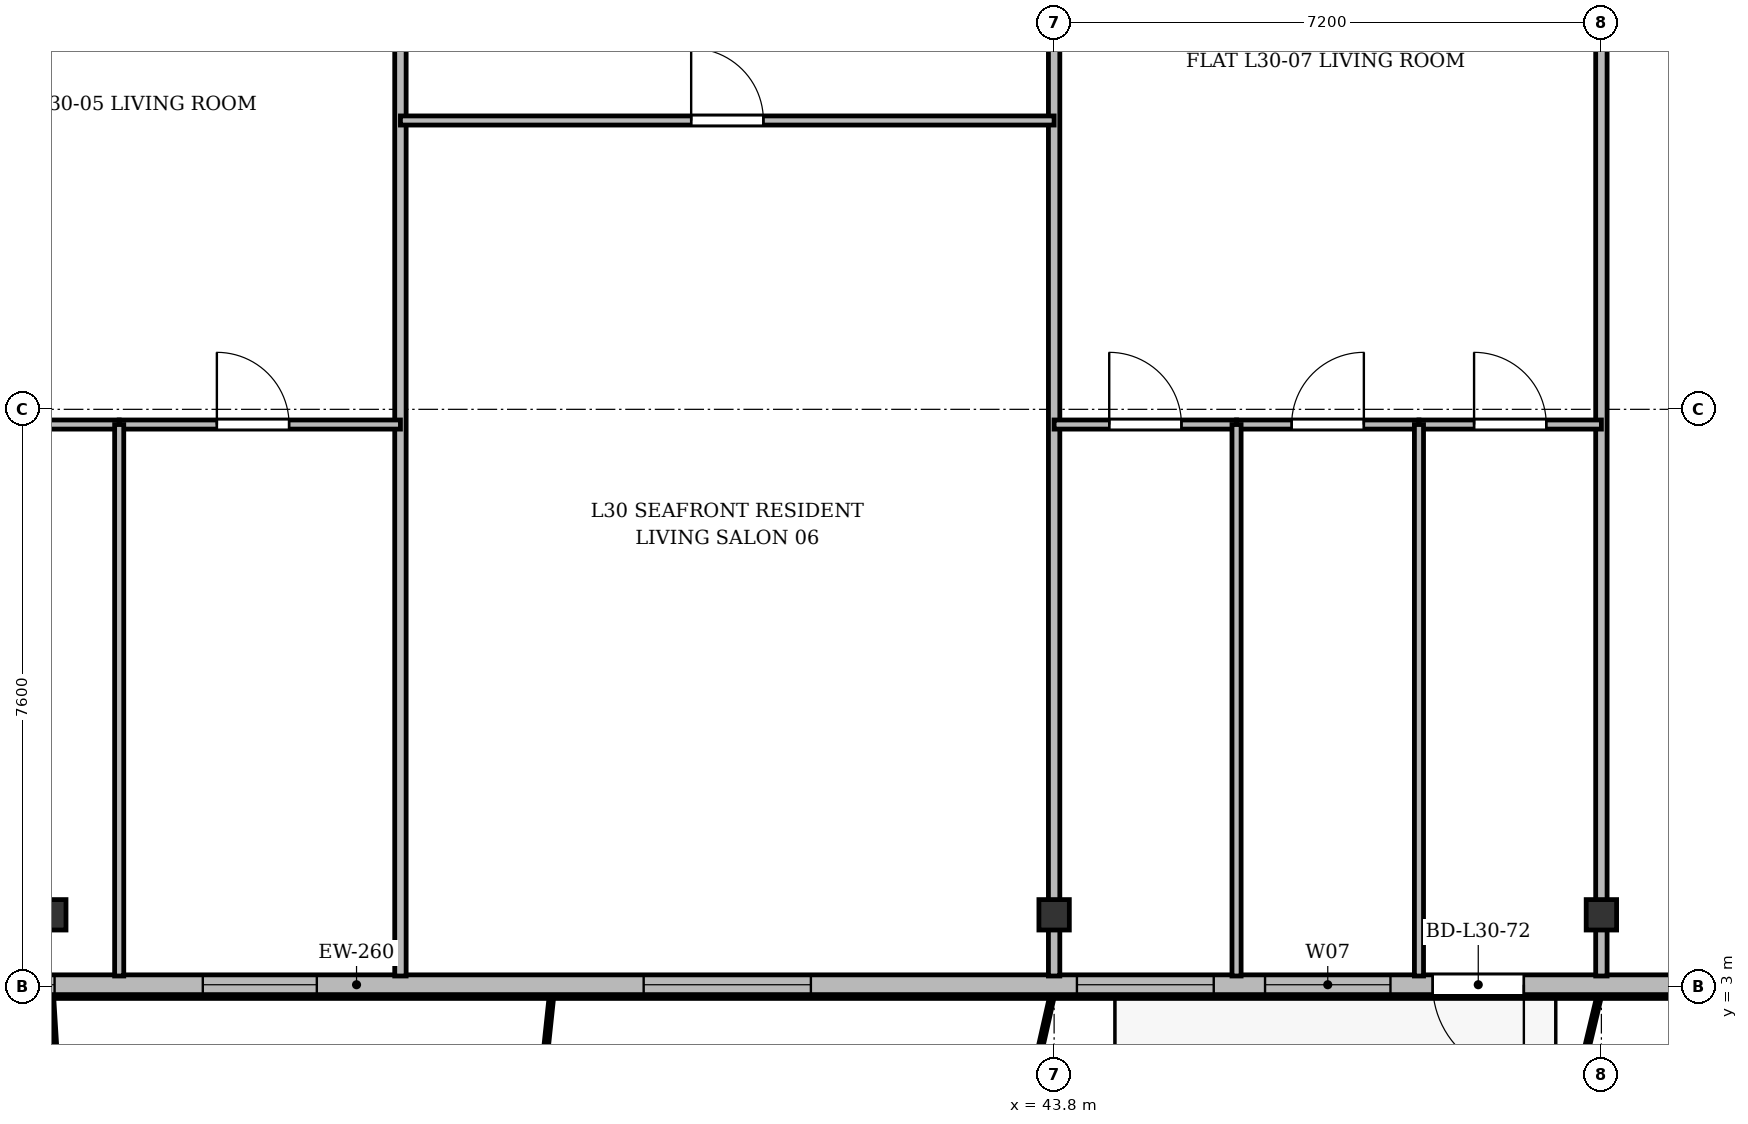
"""IFC4 building model, lengths in metres.
Left out: names, types, materials, properties, quantities, classifications, styles, units other than length and angle.
Written with IfcOpenShell. Run it as: python <this file> out.ifc"""

import sys

from ifc_helpers import new_model, si_unit, direction, frame, frame_2d, origin, origin_2d, place, context, subcontext, project, spatial, rectangle, i_section, extrude, source, transform, mapped, element, fill, save


model = new_model("IFC4")
c1 = context("Model", 3, precision=1e-05, world=origin(), true_north=direction((0.0, 1.0)))
c2 = subcontext(c1, "Body", "Model", "MODEL_VIEW")
j1 = project(units=[si_unit("LENGTHUNIT", "METRE"), si_unit("PLANEANGLEUNIT", "RADIAN")], contexts=[c1])
p1 = place(None, origin())
s1 = spatial("IfcSite", under=j1, at=p1, CompositionType="ELEMENT")
p2 = place(p1, origin())
s2 = spatial("IfcBuilding", under=s1, at=p2, CompositionType="ELEMENT")
p3 = place(p2, frame((0.0, 0.0, 117.7)))
s3 = spatial("IfcBuildingStorey", under=s2, at=p3, CompositionType="ELEMENT", Elevation=117.7)
m1 = source(origin(), c2, "Body", "SweptSolid", [
    extrude(i_section(OverallWidth=0.4, OverallDepth=0.4, WebThickness=0.022, FlangeThickness=0.035, at=origin_2d()), origin(), (0.0, 0.0, 1.0), 3.6),
])
for number, where, z_axis, x_axis in (
    (1, (30.6, 3.95, 0.0), (0.0, 0.0, 1.0), (1.0, 0.0, 0.0)),
    (2, (43.8, 3.95, 0.0), (0.0, 0.0, 1.0), (1.0, 0.0, 0.0)),
    (3, (51.0, 3.95, 0.0), (0.0, 0.0, 1.0), (1.0, 0.0, 0.0)),
):
    element("IfcColumn", number, at=place(p3, frame(where, z_axis=z_axis, x_axis=x_axis)), inside=s3, PredefinedType="COLUMN", context=c2, shape_type="MappedRepresentation", body=[
        mapped(m1, transform((0.0, 0.0, 0.0), x_axis=(1.0, 0.0, 0.0), y_axis=(0.0, 1.0, 0.0), z_axis=(0.0, 0.0, 1.0), scale=1.0)),
    ])
p4 = place(p3, frame((66.9, 3.03, 0.0), z_axis=(0.0, 0.0, 1.0), x_axis=(-1.0, 0.0, 0.0)))
e4 = element("IfcWall", 4, at=p4, inside=s3, PredefinedType="SOLIDWALL", context=c2, shape_type="SweptSolid", body=[
    extrude(rectangle(XDim=59.4, YDim=0.26, at=frame_2d((29.7, 0.0))), origin(), (0.0, 0.0, 1.0), 3.34),
])
p5 = place(p4, frame((0.395, 0.0, 0.9)))
e5 = element("IfcOpeningElement", 5, at=p5, cuts=e4, PredefinedType="OPENING", context=c2, shape_type="SweptSolid", body=[
    extrude(rectangle(XDim=1.8, YDim=1.8, at=frame_2d((0.9, 0.9))), frame((0.0, 0.14, 0.0), z_axis=(0.0, -1.0, 0.0), x_axis=(1.0, 0.0, 0.0)), (0.0, 0.0, 1.0), 0.28),
])
p6 = place(p4, frame((4.2, 0.0, 0.9)))
e6 = element("IfcOpeningElement", 6, at=p6, cuts=e4, PredefinedType="OPENING", context=c2, shape_type="SweptSolid", body=[
    extrude(rectangle(XDim=2.2, YDim=1.8, at=frame_2d((1.1, 0.9))), frame((0.0, 0.14, 0.0), z_axis=(0.0, -1.0, 0.0), x_axis=(1.0, 0.0, 0.0)), (0.0, 0.0, 1.0), 0.28),
])
p7 = place(p4, frame((11.25, 0.0, 0.9)))
e7 = element("IfcOpeningElement", 7, at=p7, cuts=e4, PredefinedType="OPENING", context=c2, shape_type="SweptSolid", body=[
    extrude(rectangle(XDim=1.5, YDim=1.75, at=frame_2d((0.75, 0.875))), frame((0.0, 0.14, 0.0), z_axis=(0.0, -1.0, 0.0), x_axis=(1.0, 0.0, 0.0)), (0.0, 0.0, 1.0), 0.28),
])
p8 = place(p4, frame((16.92, 0.0, 0.0)))
e8 = element("IfcOpeningElement", 8, at=p8, cuts=e4, PredefinedType="OPENING", context=c2, shape_type="SweptSolid", body=[
    extrude(rectangle(XDim=1.2, YDim=2.2, at=frame_2d((0.6, 1.1))), frame((0.0, 0.14, 0.0), z_axis=(0.0, -1.0, 0.0), x_axis=(1.0, 0.0, 0.0)), (0.0, 0.0, 1.0), 0.28),
])
p9 = place(p4, frame((18.675, 0.0, 0.9)))
e9 = element("IfcOpeningElement", 9, at=p9, cuts=e4, PredefinedType="OPENING", context=c2, shape_type="SweptSolid", body=[
    extrude(rectangle(XDim=1.65, YDim=1.85, at=frame_2d((0.825, 0.925))), frame((0.0, 0.14, 0.0), z_axis=(0.0, -1.0, 0.0), x_axis=(1.0, 0.0, 0.0)), (0.0, 0.0, 1.0), 0.28),
])
p10 = place(p4, frame((21.0, 0.0, 0.9)))
e10 = element("IfcOpeningElement", 10, at=p10, cuts=e4, PredefinedType="OPENING", context=c2, shape_type="SweptSolid", body=[
    extrude(rectangle(XDim=1.8, YDim=1.8, at=frame_2d((0.9, 0.9))), frame((0.0, 0.14, 0.0), z_axis=(0.0, -1.0, 0.0), x_axis=(1.0, 0.0, 0.0)), (0.0, 0.0, 1.0), 0.28),
])
p11 = place(p4, frame((26.3, 0.0, 0.9)))
e11 = element("IfcOpeningElement", 11, at=p11, cuts=e4, PredefinedType="OPENING", context=c2, shape_type="SweptSolid", body=[
    extrude(rectangle(XDim=2.2, YDim=1.8, at=frame_2d((1.1, 0.9))), frame((0.0, 0.14, 0.0), z_axis=(0.0, -1.0, 0.0), x_axis=(1.0, 0.0, 0.0)), (0.0, 0.0, 1.0), 0.28),
])
p12 = place(p4, frame((32.8, 0.0, 0.9)))
e12 = element("IfcOpeningElement", 12, at=p12, cuts=e4, PredefinedType="OPENING", context=c2, shape_type="SweptSolid", body=[
    extrude(rectangle(XDim=1.5, YDim=1.75, at=frame_2d((0.75, 0.875))), frame((0.0, 0.14, 0.0), z_axis=(0.0, -1.0, 0.0), x_axis=(1.0, 0.0, 0.0)), (0.0, 0.0, 1.0), 0.28),
])
p13 = place(p4, frame((36.25, 0.0, 0.9)))
e13 = element("IfcOpeningElement", 13, at=p13, cuts=e4, PredefinedType="OPENING", context=c2, shape_type="SweptSolid", body=[
    extrude(rectangle(XDim=2.0, YDim=1.95, at=frame_2d((1.0, 0.975))), frame((0.0, 0.14, 0.0), z_axis=(0.0, -1.0, 0.0), x_axis=(1.0, 0.0, 0.0)), (0.0, 0.0, 1.0), 0.28),
])
p14 = place(p4, frame((39.775, 0.0, 0.9)))
e14 = element("IfcOpeningElement", 14, at=p14, cuts=e4, PredefinedType="OPENING", context=c2, shape_type="SweptSolid", body=[
    extrude(rectangle(XDim=1.65, YDim=1.85, at=frame_2d((0.825, 0.925))), frame((0.0, 0.14, 0.0), z_axis=(0.0, -1.0, 0.0), x_axis=(1.0, 0.0, 0.0)), (0.0, 0.0, 1.0), 0.28),
])
p15 = place(p4, frame((42.7, 0.0, 0.9)))
e15 = element("IfcOpeningElement", 15, at=p15, cuts=e4, PredefinedType="OPENING", context=c2, shape_type="SweptSolid", body=[
    extrude(rectangle(XDim=1.8, YDim=1.8, at=frame_2d((0.9, 0.9))), frame((0.0, 0.14, 0.0), z_axis=(0.0, -1.0, 0.0), x_axis=(1.0, 0.0, 0.0)), (0.0, 0.0, 1.0), 0.28),
])
p16 = place(p4, frame((46.435, 0.0, 0.0)))
e16 = element("IfcOpeningElement", 16, at=p16, cuts=e4, PredefinedType="OPENING", context=c2, shape_type="SweptSolid", body=[
    extrude(rectangle(XDim=1.2, YDim=2.2, at=frame_2d((0.6, 1.1))), frame((0.0, 0.14, 0.0), z_axis=(0.0, -1.0, 0.0), x_axis=(1.0, 0.0, 0.0)), (0.0, 0.0, 1.0), 0.28),
])
p17 = place(p4, frame((49.0, 0.0, 0.9)))
e17 = element("IfcOpeningElement", 17, at=p17, cuts=e4, PredefinedType="OPENING", context=c2, shape_type="SweptSolid", body=[
    extrude(rectangle(XDim=1.5, YDim=1.75, at=frame_2d((0.75, 0.875))), frame((0.0, 0.14, 0.0), z_axis=(0.0, -1.0, 0.0), x_axis=(1.0, 0.0, 0.0)), (0.0, 0.0, 1.0), 0.28),
])
p18 = place(p4, frame((53.0, 0.0, 0.9)))
e18 = element("IfcOpeningElement", 18, at=p18, cuts=e4, PredefinedType="OPENING", context=c2, shape_type="SweptSolid", body=[
    extrude(rectangle(XDim=2.0, YDim=1.95, at=frame_2d((1.0, 0.975))), frame((0.0, 0.14, 0.0), z_axis=(0.0, -1.0, 0.0), x_axis=(1.0, 0.0, 0.0)), (0.0, 0.0, 1.0), 0.28),
])
p19 = place(p4, frame((57.18, 0.0, 0.9)))
e19 = element("IfcOpeningElement", 19, at=p19, cuts=e4, PredefinedType="OPENING", context=c2, shape_type="SweptSolid", body=[
    extrude(rectangle(XDim=1.65, YDim=1.85, at=frame_2d((0.825, 0.925))), frame((0.0, 0.14, 0.0), z_axis=(0.0, -1.0, 0.0), x_axis=(1.0, 0.0, 0.0)), (0.0, 0.0, 1.0), 0.28),
])
p20 = place(p3, frame((35.2, 3.145, 0.0), z_axis=(0.0, 0.0, 1.0), x_axis=(0.0, 1.0, 0.0)))
e20 = element("IfcWall", 20, at=p20, inside=s3, PredefinedType="PARTITIONING", context=c2, shape_type="SweptSolid", body=[
    extrude(rectangle(XDim=24.455, YDim=0.15, at=frame_2d((12.228, 0.0))), origin(), (0.0, 0.0, 1.0), 2.752),
])
for number, where, z_axis, x_axis in (
    (21, (43.8, 3.145, 0.0), (0.0, 0.0, 1.0), (0.0, 1.0, 0.0)),
    (22, (51.0, 3.145, 0.0), (0.0, 0.0, 1.0), (0.0, 1.0, 0.0)),
):
    element("IfcWall", number, at=place(p3, frame(where, z_axis=z_axis, x_axis=x_axis)), inside=s3, PredefinedType="PARTITIONING", context=c2, shape_type="SweptSolid", body=[
        extrude(rectangle(XDim=24.455, YDim=0.15, at=frame_2d((12.228, 0.0))), origin(), (0.0, 0.0, 1.0), 2.84),
    ])
p21 = place(p3, frame((27.8, 10.4, 0.0), z_axis=(0.0, 0.0, 1.0), x_axis=(1.0, 0.0, 0.0)))
e23 = element("IfcWall", 23, at=p21, inside=s3, PredefinedType="PARTITIONING", context=c2, shape_type="SweptSolid", body=[
    extrude(rectangle(XDim=3.7, YDim=0.12, at=frame_2d((1.85, 0.0))), origin(), (0.0, 0.0, 1.0), 2.84),
])
p22 = place(p21, frame((1.285, 0.0, 0.0)))
e24 = element("IfcOpeningElement", 24, at=p22, cuts=e23, PredefinedType="OPENING", context=c2, shape_type="SweptSolid", body=[
    extrude(rectangle(XDim=0.95, YDim=2.15, at=frame_2d((0.475, 1.075))), frame((0.0, 0.07, 0.0), z_axis=(0.0, -1.0, 0.0), x_axis=(1.0, 0.0, 0.0)), (0.0, 0.0, 1.0), 0.14),
])
p23 = place(p3, frame((31.5, 10.4, 0.0), z_axis=(0.0, 0.0, 1.0), x_axis=(1.0, 0.0, 0.0)))
e25 = element("IfcWall", 25, at=p23, inside=s3, PredefinedType="PARTITIONING", context=c2, shape_type="SweptSolid", body=[
    extrude(rectangle(XDim=3.7, YDim=0.12, at=frame_2d((1.85, 0.0))), origin(), (0.0, 0.0, 1.0), 3.34),
])
p24 = place(p23, frame((1.285, 0.0, 0.0)))
e26 = element("IfcOpeningElement", 26, at=p24, cuts=e25, PredefinedType="OPENING", context=c2, shape_type="SweptSolid", body=[
    extrude(rectangle(XDim=0.95, YDim=2.15, at=frame_2d((0.475, 1.075))), frame((0.0, 0.07, 0.0), z_axis=(0.0, -1.0, 0.0), x_axis=(1.0, 0.0, 0.0)), (0.0, 0.0, 1.0), 0.14),
])
p25 = place(p3, frame((31.5, 3.145, 0.0), z_axis=(0.0, 0.0, 1.0), x_axis=(0.0, 1.0, 0.0)))
e27 = element("IfcWall", 27, at=p25, inside=s3, PredefinedType="PARTITIONING", context=c2, shape_type="SweptSolid", body=[
    extrude(rectangle(XDim=7.255, YDim=0.12, at=frame_2d((3.627, 0.0))), origin(), (0.0, 0.0, 1.0), 2.752),
])
p26 = place(p3, frame((35.2, 14.4, 0.0), z_axis=(0.0, 0.0, 1.0), x_axis=(1.0, 0.0, 0.0)))
e28 = element("IfcWall", 28, at=p26, inside=s3, PredefinedType="PARTITIONING", context=c2, shape_type="SweptSolid", body=[
    extrude(rectangle(XDim=8.6, YDim=0.12, at=frame_2d((4.3, 0.0))), origin(), (0.0, 0.0, 1.0), 2.84),
])
p27 = place(p26, frame((3.825, 0.0, 0.0)))
e29 = element("IfcOpeningElement", 29, at=p27, cuts=e28, PredefinedType="OPENING", context=c2, shape_type="SweptSolid", body=[
    extrude(rectangle(XDim=0.95, YDim=2.15, at=frame_2d((0.475, 1.075))), frame((0.0, 0.07, 0.0), z_axis=(0.0, -1.0, 0.0), x_axis=(1.0, 0.0, 0.0)), (0.0, 0.0, 1.0), 0.14),
])
p28 = place(p3, frame((43.8, 10.4, 0.0), z_axis=(0.0, 0.0, 1.0), x_axis=(1.0, 0.0, 0.0)))
e30 = element("IfcWall", 30, at=p28, inside=s3, PredefinedType="PARTITIONING", context=c2, shape_type="SweptSolid", body=[
    extrude(rectangle(XDim=2.4, YDim=0.12, at=frame_2d((1.2, 0.0))), origin(), (0.0, 0.0, 1.0), 2.84),
])
p29 = place(p28, frame((0.725, 0.0, 0.0)))
e31 = element("IfcOpeningElement", 31, at=p29, cuts=e30, PredefinedType="OPENING", context=c2, shape_type="SweptSolid", body=[
    extrude(rectangle(XDim=0.95, YDim=2.15, at=frame_2d((0.475, 1.075))), frame((0.0, 0.07, 0.0), z_axis=(0.0, -1.0, 0.0), x_axis=(1.0, 0.0, 0.0)), (0.0, 0.0, 1.0), 0.14),
])
p30 = place(p3, frame((46.2, 10.4, 0.0), z_axis=(0.0, 0.0, 1.0), x_axis=(1.0, 0.0, 0.0)))
e32 = element("IfcWall", 32, at=p30, inside=s3, PredefinedType="PARTITIONING", context=c2, shape_type="SweptSolid", body=[
    extrude(rectangle(XDim=2.4, YDim=0.12, at=frame_2d((1.2, 0.0))), origin(), (0.0, 0.0, 1.0), 3.34),
])
p31 = place(p30, frame((0.725, 0.0, 0.0)))
e33 = element("IfcOpeningElement", 33, at=p31, cuts=e32, PredefinedType="OPENING", context=c2, shape_type="SweptSolid", body=[
    extrude(rectangle(XDim=0.95, YDim=2.15, at=frame_2d((0.475, 1.075))), frame((0.0, 0.07, 0.0), z_axis=(0.0, -1.0, 0.0), x_axis=(1.0, 0.0, 0.0)), (0.0, 0.0, 1.0), 0.14),
])
p32 = place(p3, frame((46.2, 3.145, 0.0), z_axis=(0.0, 0.0, 1.0), x_axis=(0.0, 1.0, 0.0)))
e34 = element("IfcWall", 34, at=p32, inside=s3, PredefinedType="PARTITIONING", context=c2, shape_type="SweptSolid", body=[
    extrude(rectangle(XDim=7.255, YDim=0.12, at=frame_2d((3.627, 0.0))), origin(), (0.0, 0.0, 1.0), 2.752),
])
p33 = place(p3, frame((48.6, 10.4, 0.0), z_axis=(0.0, 0.0, 1.0), x_axis=(1.0, 0.0, 0.0)))
e35 = element("IfcWall", 35, at=p33, inside=s3, PredefinedType="PARTITIONING", context=c2, shape_type="SweptSolid", body=[
    extrude(rectangle(XDim=2.4, YDim=0.12, at=frame_2d((1.2, 0.0))), origin(), (0.0, 0.0, 1.0), 2.84),
])
p34 = place(p33, frame((0.725, 0.0, 0.0)))
e36 = element("IfcOpeningElement", 36, at=p34, cuts=e35, PredefinedType="OPENING", context=c2, shape_type="SweptSolid", body=[
    extrude(rectangle(XDim=0.95, YDim=2.15, at=frame_2d((0.475, 1.075))), frame((0.0, 0.07, 0.0), z_axis=(0.0, -1.0, 0.0), x_axis=(1.0, 0.0, 0.0)), (0.0, 0.0, 1.0), 0.14),
])
p35 = place(p3, frame((48.6, 3.145, 0.0), z_axis=(0.0, 0.0, 1.0), x_axis=(0.0, 1.0, 0.0)))
e37 = element("IfcWall", 37, at=p35, inside=s3, PredefinedType="PARTITIONING", context=c2, shape_type="SweptSolid", body=[
    extrude(rectangle(XDim=7.255, YDim=0.12, at=frame_2d((3.627, 0.0))), origin(), (0.0, 0.0, 1.0), 2.752),
])
m2 = source(origin(), c2, "Body", "SweptSolid", [
    extrude(rectangle(XDim=1.2, YDim=2.2, at=frame_2d((0.6, 1.1))), frame((0.0, 0.025, 0.0), z_axis=(0.0, -1.0, 0.0), x_axis=(1.0, 0.0, 0.0)), (0.0, 0.0, 1.0), 0.05),
])
p36 = place(p8, origin())
e38 = element("IfcDoor", 38, at=p36, inside=s3, OperationType="SINGLE_SWING_LEFT", PredefinedType="DOOR", context=c2, shape_type="MappedRepresentation", body=[
    mapped(m2, transform((0.0, 0.0, 0.0), x_axis=(1.0, 0.0, 0.0), y_axis=(0.0, 1.0, 0.0), z_axis=(0.0, 0.0, 1.0), scale=1.0)),
])
fill(e8, e38)
m3 = source(origin(), c2, "Body", "SweptSolid", [
    extrude(rectangle(XDim=1.65, YDim=1.85, at=frame_2d((0.825, 0.925))), frame((0.0, 0.03, 0.0), z_axis=(0.0, -1.0, 0.0), x_axis=(1.0, 0.0, 0.0)), (0.0, 0.0, 1.0), 0.06),
])
p37 = place(p9, origin())
e39 = element("IfcWindow", 39, at=p37, inside=s3, PartitioningType="SINGLE_PANEL", PredefinedType="WINDOW", context=c2, shape_type="MappedRepresentation", body=[
    mapped(m3, transform((0.0, 0.0, 0.0), x_axis=(1.0, 0.0, 0.0), y_axis=(0.0, 1.0, 0.0), z_axis=(0.0, 0.0, 1.0), scale=1.0)),
])
fill(e9, e39)
m4 = source(origin(), c2, "Body", "SweptSolid", [
    extrude(rectangle(XDim=1.8, YDim=1.8, at=frame_2d((0.9, 0.9))), frame((0.0, 0.03, 0.0), z_axis=(0.0, -1.0, 0.0), x_axis=(1.0, 0.0, 0.0)), (0.0, 0.0, 1.0), 0.06),
])
p38 = place(p10, origin())
e40 = element("IfcWindow", 40, at=p38, inside=s3, PartitioningType="SINGLE_PANEL", PredefinedType="WINDOW", context=c2, shape_type="MappedRepresentation", body=[
    mapped(m4, transform((0.0, 0.0, 0.0), x_axis=(1.0, 0.0, 0.0), y_axis=(0.0, 1.0, 0.0), z_axis=(0.0, 0.0, 1.0), scale=1.0)),
])
fill(e10, e40)
m5 = source(origin(), c2, "Body", "SweptSolid", [
    extrude(rectangle(XDim=2.2, YDim=1.8, at=frame_2d((1.1, 0.9))), frame((0.0, 0.03, 0.0), z_axis=(0.0, -1.0, 0.0), x_axis=(1.0, 0.0, 0.0)), (0.0, 0.0, 1.0), 0.06),
])
p39 = place(p11, origin())
e41 = element("IfcWindow", 41, at=p39, inside=s3, PartitioningType="SINGLE_PANEL", PredefinedType="WINDOW", context=c2, shape_type="MappedRepresentation", body=[
    mapped(m5, transform((0.0, 0.0, 0.0), x_axis=(1.0, 0.0, 0.0), y_axis=(0.0, 1.0, 0.0), z_axis=(0.0, 0.0, 1.0), scale=1.0)),
])
fill(e11, e41)
m6 = source(origin(), c2, "Body", "SweptSolid", [
    extrude(rectangle(XDim=1.5, YDim=1.75, at=frame_2d((0.75, 0.875))), frame((0.0, 0.03, 0.0), z_axis=(0.0, -1.0, 0.0), x_axis=(1.0, 0.0, 0.0)), (0.0, 0.0, 1.0), 0.06),
])
p40 = place(p12, origin())
e42 = element("IfcWindow", 42, at=p40, inside=s3, PartitioningType="SINGLE_PANEL", PredefinedType="WINDOW", context=c2, shape_type="MappedRepresentation", body=[
    mapped(m6, transform((0.0, 0.0, 0.0), x_axis=(1.0, 0.0, 0.0), y_axis=(0.0, 1.0, 0.0), z_axis=(0.0, 0.0, 1.0), scale=1.0)),
])
fill(e12, e42)
m7 = source(origin(), c2, "Body", "SweptSolid", [
    extrude(rectangle(XDim=2.0, YDim=1.95, at=frame_2d((1.0, 0.975))), frame((0.0, 0.03, 0.0), z_axis=(0.0, -1.0, 0.0), x_axis=(1.0, 0.0, 0.0)), (0.0, 0.0, 1.0), 0.06),
])
p41 = place(p13, origin())
e43 = element("IfcWindow", 43, at=p41, inside=s3, PartitioningType="SINGLE_PANEL", PredefinedType="WINDOW", context=c2, shape_type="MappedRepresentation", body=[
    mapped(m7, transform((0.0, 0.0, 0.0), x_axis=(1.0, 0.0, 0.0), y_axis=(0.0, 1.0, 0.0), z_axis=(0.0, 0.0, 1.0), scale=1.0)),
])
fill(e13, e43)
m8 = source(origin(), c2, "Body", "SweptSolid", [
    extrude(rectangle(XDim=0.95, YDim=2.15, at=frame_2d((0.475, 1.075))), frame((0.0, 0.025, 0.0), z_axis=(0.0, -1.0, 0.0), x_axis=(1.0, 0.0, 0.0)), (0.0, 0.0, 1.0), 0.05),
])
p42 = place(p24, origin())
e44 = element("IfcDoor", 44, at=p42, inside=s3, OperationType="SINGLE_SWING_LEFT", PredefinedType="DOOR", context=c2, shape_type="MappedRepresentation", body=[
    mapped(m8, transform((0.0, 0.0, 0.0), x_axis=(1.0, 0.0, 0.0), y_axis=(0.0, 1.0, 0.0), z_axis=(0.0, 0.0, 1.0), scale=1.0)),
])
fill(e26, e44)
p43 = place(p27, origin())
e45 = element("IfcDoor", 45, at=p43, inside=s3, OperationType="SINGLE_SWING_LEFT", PredefinedType="DOOR", context=c2, shape_type="MappedRepresentation", body=[
    mapped(m8, transform((0.0, 0.0, 0.0), x_axis=(1.0, 0.0, 0.0), y_axis=(0.0, 1.0, 0.0), z_axis=(0.0, 0.0, 1.0), scale=1.0)),
])
fill(e29, e45)
p44 = place(p29, origin())
e46 = element("IfcDoor", 46, at=p44, inside=s3, OperationType="SINGLE_SWING_LEFT", PredefinedType="DOOR", context=c2, shape_type="MappedRepresentation", body=[
    mapped(m8, transform((0.0, 0.0, 0.0), x_axis=(1.0, 0.0, 0.0), y_axis=(0.0, 1.0, 0.0), z_axis=(0.0, 0.0, 1.0), scale=1.0)),
])
fill(e31, e46)
p45 = place(p31, origin())
e47 = element("IfcDoor", 47, at=p45, inside=s3, OperationType="SINGLE_SWING_RIGHT", PredefinedType="DOOR", context=c2, shape_type="MappedRepresentation", body=[
    mapped(m8, transform((0.0, 0.0, 0.0), x_axis=(1.0, 0.0, 0.0), y_axis=(0.0, 1.0, 0.0), z_axis=(0.0, 0.0, 1.0), scale=1.0)),
])
fill(e33, e47)
p46 = place(p34, origin())
e48 = element("IfcDoor", 48, at=p46, inside=s3, OperationType="SINGLE_SWING_LEFT", PredefinedType="DOOR", context=c2, shape_type="MappedRepresentation", body=[
    mapped(m8, transform((0.0, 0.0, 0.0), x_axis=(1.0, 0.0, 0.0), y_axis=(0.0, 1.0, 0.0), z_axis=(0.0, 0.0, 1.0), scale=1.0)),
])
fill(e36, e48)
save(model, sys.argv[1])
